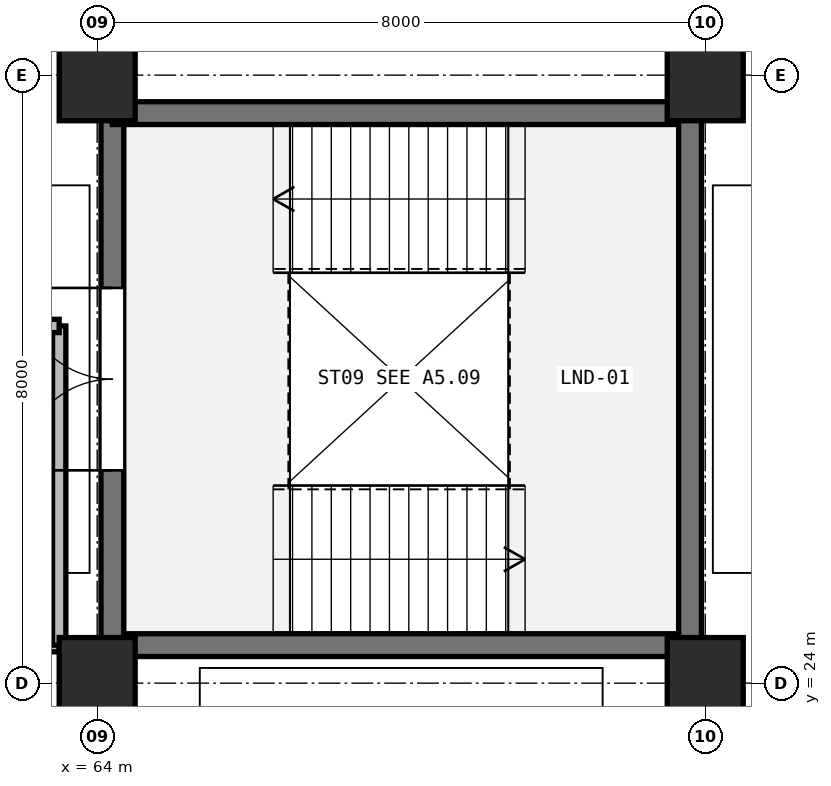
"""IFC4 building model, lengths in metres.
Left out: names, types, materials, properties, quantities, classifications, styles, units other than length and angle.
Written with IfcOpenShell. Run it as: python <this file> out.ifc"""

import sys

from ifc_helpers import new_model, si_unit, direction, frame, frame_2d, origin, origin_2d, place, context, subcontext, project, spatial, rectangle, extrude, element, fill, save


model = new_model("IFC4")
c1 = context("Model", 3, precision=1e-05, world=origin(), true_north=direction((0.0, 1.0)))
c2 = subcontext(c1, "Body", "Model", "MODEL_VIEW")
j1 = project(units=[si_unit("LENGTHUNIT", "METRE"), si_unit("PLANEANGLEUNIT", "RADIAN")], contexts=[c1])
p1 = place(None, origin())
s1 = spatial("IfcSite", under=j1, at=p1, CompositionType="ELEMENT")
p2 = place(p1, origin())
s2 = spatial("IfcBuilding", under=s1, at=p2, CompositionType="ELEMENT")
p3 = place(p2, frame((0.0, 0.0, 10.2)))
s3 = spatial("IfcBuildingStorey", under=s2, at=p3, CompositionType="ELEMENT", Elevation=10.2)
for number, where, z_axis, x_axis in (
    (1, (64.0, 24.0, 0.0), (0.0, 0.0, 1.0), (1.0, 0.0, 0.0)),
    (2, (64.0, 32.0, 0.0), (0.0, 0.0, 1.0), (1.0, 0.0, 0.0)),
    (3, (72.0, 24.0, 0.0), (0.0, 0.0, 1.0), (1.0, 0.0, 0.0)),
    (4, (72.0, 32.0, 0.0), (0.0, 0.0, 1.0), (1.0, 0.0, 0.0)),
):
    element("IfcColumn", number, at=place(p3, frame(where, z_axis=z_axis, x_axis=x_axis)), inside=s3, PredefinedType="COLUMN", context=c2, shape_type="SweptSolid", body=[
        extrude(rectangle(XDim=1.0, YDim=1.2, at=origin_2d()), origin(), (0.0, 0.0, 1.0), 4.8),
    ])
p4 = place(p3, frame((71.8, 24.5, 0.0), z_axis=(0.0, 0.0, 1.0), x_axis=(-1.0, 0.0, 0.0)))
e5 = element("IfcWall", 5, at=p4, inside=s3, PredefinedType="SHEAR", context=c2, shape_type="SweptSolid", body=[
    extrude(rectangle(XDim=7.6, YDim=0.3, at=frame_2d((3.8, 0.0))), origin(), (0.0, 0.0, 1.0), 4.46),
])
p5 = place(p3, frame((64.2, 24.5, 0.0), z_axis=(0.0, 0.0, 1.0), x_axis=(0.0, 1.0, 0.0)))
e6 = element("IfcWall", 6, at=p5, inside=s3, PredefinedType="SHEAR", context=c2, shape_type="SweptSolid", body=[
    extrude(rectangle(XDim=7.0, YDim=0.3, at=frame_2d((3.5, 0.0))), origin(), (0.0, 0.0, 1.0), 4.46),
])
p6 = place(p5, frame((2.3, 0.0, 0.0)))
e7 = element("IfcOpeningElement", 7, at=p6, cuts=e6, PredefinedType="OPENING", context=c2, shape_type="SweptSolid", body=[
    extrude(rectangle(XDim=2.4, YDim=2.2, at=frame_2d((1.2, 1.1))), frame((0.0, 0.16, 0.0), z_axis=(0.0, -1.0, 0.0), x_axis=(1.0, 0.0, 0.0)), (0.0, 0.0, 1.0), 0.32),
])
p7 = place(p3, frame((64.2, 31.5, 0.0), z_axis=(0.0, 0.0, 1.0), x_axis=(1.0, 0.0, 0.0)))
e8 = element("IfcWall", 8, at=p7, inside=s3, PredefinedType="SHEAR", context=c2, shape_type="SweptSolid", body=[
    extrude(rectangle(XDim=7.6, YDim=0.3, at=frame_2d((3.8, 0.0))), origin(), (0.0, 0.0, 1.0), 4.46),
])
p8 = place(p3, frame((71.8, 31.5, 0.0), z_axis=(0.0, 0.0, 1.0), x_axis=(0.0, -1.0, 0.0)))
e9 = element("IfcWall", 9, at=p8, inside=s3, PredefinedType="SHEAR", context=c2, shape_type="SweptSolid", body=[
    extrude(rectangle(XDim=7.0, YDim=0.3, at=frame_2d((3.5, 0.0))), origin(), (0.0, 0.0, 1.0), 4.46),
])
p9 = place(p3, frame((60.3, 24.5, 0.0), z_axis=(0.0, 0.0, 1.0), x_axis=(1.0, 0.0, 0.0)))
e10 = element("IfcWall", 10, at=p9, inside=s3, PredefinedType="PARTITIONING", context=c2, shape_type="SweptSolid", body=[
    extrude(rectangle(XDim=3.2, YDim=0.175, at=frame_2d((1.6, 0.0))), origin(), (0.0, 0.0, 1.0), 4.46),
])
p10 = place(p3, frame((63.5, 24.5, 0.0), z_axis=(0.0, 0.0, 1.0), x_axis=(0.0, 1.0, 0.0)))
e11 = element("IfcWall", 11, at=p10, inside=s3, PredefinedType="PARTITIONING", context=c2, shape_type="SweptSolid", body=[
    extrude(rectangle(XDim=4.2, YDim=0.175, at=frame_2d((2.1, 0.0))), origin(), (0.0, 0.0, 1.0), 3.6),
])
p11 = place(p3, frame((63.5, 28.7, 0.0), z_axis=(0.0, 0.0, 1.0), x_axis=(-1.0, 0.0, 0.0)))
e12 = element("IfcWall", 12, at=p11, inside=s3, PredefinedType="PARTITIONING", context=c2, shape_type="SweptSolid", body=[
    extrude(rectangle(XDim=3.2, YDim=0.175, at=frame_2d((1.6, 0.0))), origin(), (0.0, 0.0, 1.0), 4.46),
])
p12 = place(p11, frame((1.125, 0.0, 0.0)))
e13 = element("IfcOpeningElement", 13, at=p12, cuts=e12, PredefinedType="OPENING", context=c2, shape_type="SweptSolid", body=[
    extrude(rectangle(XDim=0.95, YDim=2.15, at=frame_2d((0.475, 1.075))), frame((0.0, 0.098, 0.0), z_axis=(0.0, -1.0, 0.0), x_axis=(1.0, 0.0, 0.0)), (0.0, 0.0, 1.0), 0.195),
])
p13 = place(p6, frame((2.4, 0.0, 0.0), z_axis=(0.0, 0.0, 1.0), x_axis=(-1.0, 0.0, 0.0)))
e14 = element("IfcDoor", 14, at=p13, inside=s3, OperationType="DOUBLE_DOOR_SINGLE_SWING", PredefinedType="DOOR", context=c2, shape_type="SweptSolid", body=[
    extrude(rectangle(XDim=2.4, YDim=2.2, at=frame_2d((1.2, 1.1))), frame((0.0, 0.025, 0.0), z_axis=(0.0, -1.0, 0.0), x_axis=(1.0, 0.0, 0.0)), (0.0, 0.0, 1.0), 0.05),
])
fill(e7, e14)
save(model, sys.argv[1])
